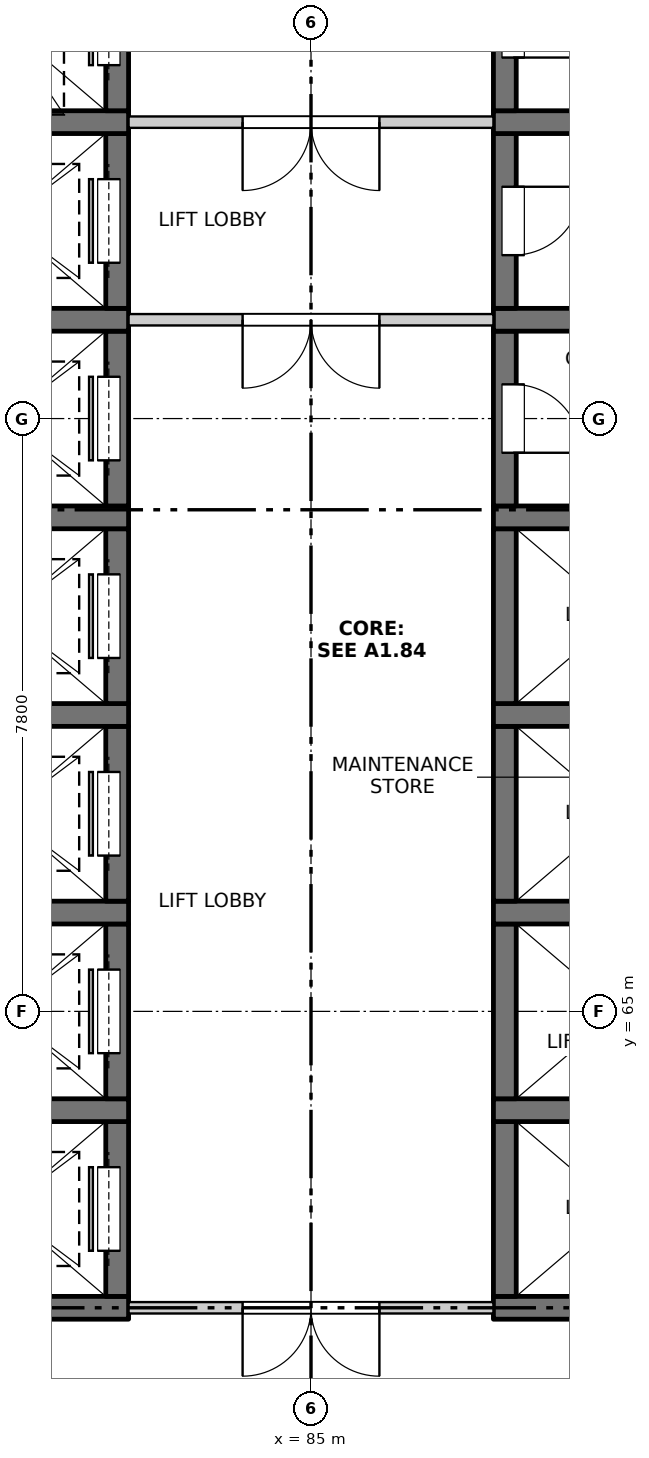
"""IFC4 building model, lengths in metres.
Left out: names, types, materials, properties, quantities, classifications, styles, units other than length and angle.
Written with IfcOpenShell. Run it as: python <this file> out.ifc"""

import sys

from ifc_helpers import new_model, si_unit, direction, frame, frame_2d, origin, place, context, subcontext, project, spatial, rectangle, extrude, element, fill, save


model = new_model("IFC4")
c1 = context("Model", 3, precision=1e-05, world=origin(), true_north=direction((0.0, 1.0)))
c2 = subcontext(c1, "Body", "Model", "MODEL_VIEW")
j1 = project(units=[si_unit("LENGTHUNIT", "METRE"), si_unit("PLANEANGLEUNIT", "RADIAN")], contexts=[c1])
p1 = place(None, origin())
s1 = spatial("IfcSite", under=j1, at=p1, CompositionType="ELEMENT")
p2 = place(p1, origin())
s2 = spatial("IfcBuilding", under=s1, at=p2, CompositionType="ELEMENT")
p3 = place(p2, frame((0.0, 0.0, 103.3)))
s3 = spatial("IfcBuildingStorey", under=s2, at=p3, CompositionType="ELEMENT", Elevation=103.3)
p4 = place(p3, frame((79.6, 61.1, -0.25), z_axis=(0.0, 0.0, 1.0), x_axis=(1.0, 0.0, 0.0)))
e1 = element("IfcWall", 1, at=p4, inside=s3, PredefinedType="SOLIDWALL", context=c2, shape_type="SweptSolid", body=[
    extrude(rectangle(XDim=3.0, YDim=0.3, at=frame_2d((1.5, 0.0))), origin(), (0.0, 0.0, 1.0), 3.4),
])
p5 = place(p3, frame((82.45, 61.25, -0.25), z_axis=(0.0, 0.0, 1.0), x_axis=(0.0, 1.0, 0.0)))
e2 = element("IfcWall", 2, at=p5, inside=s3, PredefinedType="SOLIDWALL", context=c2, shape_type="SweptSolid", body=[
    extrude(rectangle(XDim=2.3, YDim=0.3, at=frame_2d((1.15, 0.0))), origin(), (0.0, 0.0, 1.0), 3.4),
])
p6 = place(p5, frame((0.6, 0.0, 0.25)))
e3 = element("IfcOpeningElement", 3, at=p6, cuts=e2, PredefinedType="OPENING", context=c2, shape_type="SweptSolid", body=[
    extrude(rectangle(XDim=1.1, YDim=2.1, at=frame_2d((0.55, 1.05))), frame((0.0, 0.16, 0.0), z_axis=(0.0, -1.0, 0.0), x_axis=(1.0, 0.0, 0.0)), (0.0, 0.0, 1.0), 0.32),
])
p7 = place(p3, frame((79.6, 63.7, -0.25), z_axis=(0.0, 0.0, 1.0), x_axis=(1.0, 0.0, 0.0)))
e4 = element("IfcWall", 4, at=p7, inside=s3, PredefinedType="SOLIDWALL", context=c2, shape_type="SweptSolid", body=[
    extrude(rectangle(XDim=3.0, YDim=0.3, at=frame_2d((1.5, 0.0))), origin(), (0.0, 0.0, 1.0), 3.4),
])
p8 = place(p3, frame((82.45, 63.85, -0.25), z_axis=(0.0, 0.0, 1.0), x_axis=(0.0, 1.0, 0.0)))
e5 = element("IfcWall", 5, at=p8, inside=s3, PredefinedType="SOLIDWALL", context=c2, shape_type="SweptSolid", body=[
    extrude(rectangle(XDim=2.3, YDim=0.3, at=frame_2d((1.15, 0.0))), origin(), (0.0, 0.0, 1.0), 3.4),
])
p9 = place(p8, frame((0.6, 0.0, 0.25)))
e6 = element("IfcOpeningElement", 6, at=p9, cuts=e5, PredefinedType="OPENING", context=c2, shape_type="SweptSolid", body=[
    extrude(rectangle(XDim=1.1, YDim=2.1, at=frame_2d((0.55, 1.05))), frame((0.0, 0.16, 0.0), z_axis=(0.0, -1.0, 0.0), x_axis=(1.0, 0.0, 0.0)), (0.0, 0.0, 1.0), 0.32),
])
p10 = place(p3, frame((79.6, 66.3, -0.25), z_axis=(0.0, 0.0, 1.0), x_axis=(1.0, 0.0, 0.0)))
e7 = element("IfcWall", 7, at=p10, inside=s3, PredefinedType="SOLIDWALL", context=c2, shape_type="SweptSolid", body=[
    extrude(rectangle(XDim=3.0, YDim=0.3, at=frame_2d((1.5, 0.0))), origin(), (0.0, 0.0, 1.0), 3.4),
])
p11 = place(p3, frame((82.45, 66.45, -0.25), z_axis=(0.0, 0.0, 1.0), x_axis=(0.0, 1.0, 0.0)))
e8 = element("IfcWall", 8, at=p11, inside=s3, PredefinedType="SOLIDWALL", context=c2, shape_type="SweptSolid", body=[
    extrude(rectangle(XDim=2.3, YDim=0.3, at=frame_2d((1.15, 0.0))), origin(), (0.0, 0.0, 1.0), 3.4),
])
p12 = place(p11, frame((0.6, 0.0, 0.25)))
e9 = element("IfcOpeningElement", 9, at=p12, cuts=e8, PredefinedType="OPENING", context=c2, shape_type="SweptSolid", body=[
    extrude(rectangle(XDim=1.1, YDim=2.1, at=frame_2d((0.55, 1.05))), frame((0.0, 0.16, 0.0), z_axis=(0.0, -1.0, 0.0), x_axis=(1.0, 0.0, 0.0)), (0.0, 0.0, 1.0), 0.32),
])
p13 = place(p3, frame((79.6, 68.9, -0.25), z_axis=(0.0, 0.0, 1.0), x_axis=(1.0, 0.0, 0.0)))
e10 = element("IfcWall", 10, at=p13, inside=s3, PredefinedType="SOLIDWALL", context=c2, shape_type="SweptSolid", body=[
    extrude(rectangle(XDim=3.0, YDim=0.3, at=frame_2d((1.5, 0.0))), origin(), (0.0, 0.0, 1.0), 3.4),
])
p14 = place(p3, frame((82.45, 69.05, -0.25), z_axis=(0.0, 0.0, 1.0), x_axis=(0.0, 1.0, 0.0)))
e11 = element("IfcWall", 11, at=p14, inside=s3, PredefinedType="SOLIDWALL", context=c2, shape_type="SweptSolid", body=[
    extrude(rectangle(XDim=2.3, YDim=0.3, at=frame_2d((1.15, 0.0))), origin(), (0.0, 0.0, 1.0), 3.4),
])
p15 = place(p14, frame((0.6, 0.0, 0.25)))
e12 = element("IfcOpeningElement", 12, at=p15, cuts=e11, PredefinedType="OPENING", context=c2, shape_type="SweptSolid", body=[
    extrude(rectangle(XDim=1.1, YDim=2.1, at=frame_2d((0.55, 1.05))), frame((0.0, 0.16, 0.0), z_axis=(0.0, -1.0, 0.0), x_axis=(1.0, 0.0, 0.0)), (0.0, 0.0, 1.0), 0.32),
])
p16 = place(p3, frame((79.6, 71.5, -0.25), z_axis=(0.0, 0.0, 1.0), x_axis=(1.0, 0.0, 0.0)))
e13 = element("IfcWall", 13, at=p16, inside=s3, PredefinedType="SOLIDWALL", context=c2, shape_type="SweptSolid", body=[
    extrude(rectangle(XDim=3.0, YDim=0.3, at=frame_2d((1.5, 0.0))), origin(), (0.0, 0.0, 1.0), 3.4),
])
p17 = place(p3, frame((82.45, 71.65, -0.25), z_axis=(0.0, 0.0, 1.0), x_axis=(0.0, 1.0, 0.0)))
e14 = element("IfcWall", 14, at=p17, inside=s3, PredefinedType="SOLIDWALL", context=c2, shape_type="SweptSolid", body=[
    extrude(rectangle(XDim=2.3, YDim=0.3, at=frame_2d((1.15, 0.0))), origin(), (0.0, 0.0, 1.0), 3.4),
])
p18 = place(p17, frame((0.6, 0.0, 0.25)))
e15 = element("IfcOpeningElement", 15, at=p18, cuts=e14, PredefinedType="OPENING", context=c2, shape_type="SweptSolid", body=[
    extrude(rectangle(XDim=1.1, YDim=2.1, at=frame_2d((0.55, 1.05))), frame((0.0, 0.16, 0.0), z_axis=(0.0, -1.0, 0.0), x_axis=(1.0, 0.0, 0.0)), (0.0, 0.0, 1.0), 0.32),
])
p19 = place(p3, frame((79.6, 74.1, -0.25), z_axis=(0.0, 0.0, 1.0), x_axis=(1.0, 0.0, 0.0)))
e16 = element("IfcWall", 16, at=p19, inside=s3, PredefinedType="SOLIDWALL", context=c2, shape_type="SweptSolid", body=[
    extrude(rectangle(XDim=3.0, YDim=0.3, at=frame_2d((1.5, 0.0))), origin(), (0.0, 0.0, 1.0), 3.4),
])
p20 = place(p3, frame((82.45, 74.25, -0.25), z_axis=(0.0, 0.0, 1.0), x_axis=(0.0, 1.0, 0.0)))
e17 = element("IfcWall", 17, at=p20, inside=s3, PredefinedType="SOLIDWALL", context=c2, shape_type="SweptSolid", body=[
    extrude(rectangle(XDim=2.3, YDim=0.3, at=frame_2d((1.15, 0.0))), origin(), (0.0, 0.0, 1.0), 3.4),
])
p21 = place(p20, frame((0.6, 0.0, 0.25)))
e18 = element("IfcOpeningElement", 18, at=p21, cuts=e17, PredefinedType="OPENING", context=c2, shape_type="SweptSolid", body=[
    extrude(rectangle(XDim=1.1, YDim=2.1, at=frame_2d((0.55, 1.05))), frame((0.0, 0.16, 0.0), z_axis=(0.0, -1.0, 0.0), x_axis=(1.0, 0.0, 0.0)), (0.0, 0.0, 1.0), 0.32),
])
p22 = place(p3, frame((79.6, 76.7, -0.25), z_axis=(0.0, 0.0, 1.0), x_axis=(1.0, 0.0, 0.0)))
e19 = element("IfcWall", 19, at=p22, inside=s3, PredefinedType="SOLIDWALL", context=c2, shape_type="SweptSolid", body=[
    extrude(rectangle(XDim=3.0, YDim=0.3, at=frame_2d((1.5, 0.0))), origin(), (0.0, 0.0, 1.0), 3.4),
])
p23 = place(p3, frame((82.45, 76.85, -0.25), z_axis=(0.0, 0.0, 1.0), x_axis=(0.0, 1.0, 0.0)))
e20 = element("IfcWall", 20, at=p23, inside=s3, PredefinedType="SOLIDWALL", context=c2, shape_type="SweptSolid", body=[
    extrude(rectangle(XDim=2.3, YDim=0.3, at=frame_2d((1.15, 0.0))), origin(), (0.0, 0.0, 1.0), 3.4),
])
p24 = place(p23, frame((0.6, 0.0, 0.25)))
e21 = element("IfcOpeningElement", 21, at=p24, cuts=e20, PredefinedType="OPENING", context=c2, shape_type="SweptSolid", body=[
    extrude(rectangle(XDim=1.1, YDim=2.1, at=frame_2d((0.55, 1.05))), frame((0.0, 0.16, 0.0), z_axis=(0.0, -1.0, 0.0), x_axis=(1.0, 0.0, 0.0)), (0.0, 0.0, 1.0), 0.32),
])
p25 = place(p3, frame((87.4, 61.1, -0.25), z_axis=(0.0, 0.0, 1.0), x_axis=(1.0, 0.0, 0.0)))
e22 = element("IfcWall", 22, at=p25, inside=s3, PredefinedType="SOLIDWALL", context=c2, shape_type="SweptSolid", body=[
    extrude(rectangle(XDim=3.0, YDim=0.3, at=frame_2d((1.5, 0.0))), origin(), (0.0, 0.0, 1.0), 3.4),
])
p26 = place(p3, frame((87.55, 61.25, -0.25), z_axis=(0.0, 0.0, 1.0), x_axis=(0.0, 1.0, 0.0)))
e23 = element("IfcWall", 23, at=p26, inside=s3, PredefinedType="SOLIDWALL", context=c2, shape_type="SweptSolid", body=[
    extrude(rectangle(XDim=2.3, YDim=0.3, at=frame_2d((1.15, 0.0))), origin(), (0.0, 0.0, 1.0), 3.4),
])
p27 = place(p3, frame((87.4, 63.7, -0.25), z_axis=(0.0, 0.0, 1.0), x_axis=(1.0, 0.0, 0.0)))
e24 = element("IfcWall", 24, at=p27, inside=s3, PredefinedType="SOLIDWALL", context=c2, shape_type="SweptSolid", body=[
    extrude(rectangle(XDim=3.0, YDim=0.3, at=frame_2d((1.5, 0.0))), origin(), (0.0, 0.0, 1.0), 3.4),
])
p28 = place(p3, frame((87.55, 63.85, -0.25), z_axis=(0.0, 0.0, 1.0), x_axis=(0.0, 1.0, 0.0)))
e25 = element("IfcWall", 25, at=p28, inside=s3, PredefinedType="SOLIDWALL", context=c2, shape_type="SweptSolid", body=[
    extrude(rectangle(XDim=2.3, YDim=0.3, at=frame_2d((1.15, 0.0))), origin(), (0.0, 0.0, 1.0), 3.4),
])
p29 = place(p3, frame((87.4, 66.3, -0.25), z_axis=(0.0, 0.0, 1.0), x_axis=(1.0, 0.0, 0.0)))
e26 = element("IfcWall", 26, at=p29, inside=s3, PredefinedType="SOLIDWALL", context=c2, shape_type="SweptSolid", body=[
    extrude(rectangle(XDim=3.0, YDim=0.3, at=frame_2d((1.5, 0.0))), origin(), (0.0, 0.0, 1.0), 3.4),
])
p30 = place(p3, frame((87.55, 66.45, -0.25), z_axis=(0.0, 0.0, 1.0), x_axis=(0.0, 1.0, 0.0)))
e27 = element("IfcWall", 27, at=p30, inside=s3, PredefinedType="SOLIDWALL", context=c2, shape_type="SweptSolid", body=[
    extrude(rectangle(XDim=2.3, YDim=0.3, at=frame_2d((1.15, 0.0))), origin(), (0.0, 0.0, 1.0), 3.4),
])
p31 = place(p3, frame((87.4, 68.9, -0.25), z_axis=(0.0, 0.0, 1.0), x_axis=(1.0, 0.0, 0.0)))
e28 = element("IfcWall", 28, at=p31, inside=s3, PredefinedType="SOLIDWALL", context=c2, shape_type="SweptSolid", body=[
    extrude(rectangle(XDim=3.0, YDim=0.3, at=frame_2d((1.5, 0.0))), origin(), (0.0, 0.0, 1.0), 3.4),
])
p32 = place(p3, frame((87.55, 69.05, -0.25), z_axis=(0.0, 0.0, 1.0), x_axis=(0.0, 1.0, 0.0)))
e29 = element("IfcWall", 29, at=p32, inside=s3, PredefinedType="SOLIDWALL", context=c2, shape_type="SweptSolid", body=[
    extrude(rectangle(XDim=2.3, YDim=0.3, at=frame_2d((1.15, 0.0))), origin(), (0.0, 0.0, 1.0), 3.4),
])
p33 = place(p3, frame((87.4, 71.5, -0.25), z_axis=(0.0, 0.0, 1.0), x_axis=(1.0, 0.0, 0.0)))
e30 = element("IfcWall", 30, at=p33, inside=s3, PredefinedType="SOLIDWALL", context=c2, shape_type="SweptSolid", body=[
    extrude(rectangle(XDim=3.0, YDim=0.3, at=frame_2d((1.5, 0.0))), origin(), (0.0, 0.0, 1.0), 3.4),
])
p34 = place(p3, frame((87.55, 71.65, -0.25), z_axis=(0.0, 0.0, 1.0), x_axis=(0.0, 1.0, 0.0)))
e31 = element("IfcWall", 31, at=p34, inside=s3, PredefinedType="SOLIDWALL", context=c2, shape_type="SweptSolid", body=[
    extrude(rectangle(XDim=2.3, YDim=0.3, at=frame_2d((1.15, 0.0))), origin(), (0.0, 0.0, 1.0), 3.4),
])
p35 = place(p34, frame((0.7, 0.0, 0.25)))
e32 = element("IfcOpeningElement", 32, at=p35, cuts=e31, PredefinedType="OPENING", context=c2, shape_type="SweptSolid", body=[
    extrude(rectangle(XDim=0.9, YDim=2.1, at=frame_2d((0.45, 1.05))), frame((0.0, 0.16, 0.0), z_axis=(0.0, -1.0, 0.0), x_axis=(1.0, 0.0, 0.0)), (0.0, 0.0, 1.0), 0.32),
])
p36 = place(p3, frame((87.4, 74.1, -0.25), z_axis=(0.0, 0.0, 1.0), x_axis=(1.0, 0.0, 0.0)))
e33 = element("IfcWall", 33, at=p36, inside=s3, PredefinedType="SOLIDWALL", context=c2, shape_type="SweptSolid", body=[
    extrude(rectangle(XDim=3.0, YDim=0.3, at=frame_2d((1.5, 0.0))), origin(), (0.0, 0.0, 1.0), 3.4),
])
p37 = place(p3, frame((87.55, 74.25, -0.25), z_axis=(0.0, 0.0, 1.0), x_axis=(0.0, 1.0, 0.0)))
e34 = element("IfcWall", 34, at=p37, inside=s3, PredefinedType="SOLIDWALL", context=c2, shape_type="SweptSolid", body=[
    extrude(rectangle(XDim=2.3, YDim=0.3, at=frame_2d((1.15, 0.0))), origin(), (0.0, 0.0, 1.0), 3.4),
])
p38 = place(p37, frame((0.7, 0.0, 0.25)))
e35 = element("IfcOpeningElement", 35, at=p38, cuts=e34, PredefinedType="OPENING", context=c2, shape_type="SweptSolid", body=[
    extrude(rectangle(XDim=0.9, YDim=2.1, at=frame_2d((0.45, 1.05))), frame((0.0, 0.16, 0.0), z_axis=(0.0, -1.0, 0.0), x_axis=(1.0, 0.0, 0.0)), (0.0, 0.0, 1.0), 0.32),
])
p39 = place(p3, frame((87.4, 76.7, -0.25), z_axis=(0.0, 0.0, 1.0), x_axis=(1.0, 0.0, 0.0)))
e36 = element("IfcWall", 36, at=p39, inside=s3, PredefinedType="SOLIDWALL", context=c2, shape_type="SweptSolid", body=[
    extrude(rectangle(XDim=3.0, YDim=0.3, at=frame_2d((1.5, 0.0))), origin(), (0.0, 0.0, 1.0), 3.4),
])
p40 = place(p3, frame((87.55, 76.85, -0.25), z_axis=(0.0, 0.0, 1.0), x_axis=(0.0, 1.0, 0.0)))
e37 = element("IfcWall", 37, at=p40, inside=s3, PredefinedType="SOLIDWALL", context=c2, shape_type="SweptSolid", body=[
    extrude(rectangle(XDim=2.3, YDim=0.3, at=frame_2d((1.15, 0.0))), origin(), (0.0, 0.0, 1.0), 3.4),
])
p41 = place(p40, frame((0.7, 0.0, 0.25)))
e38 = element("IfcOpeningElement", 38, at=p41, cuts=e37, PredefinedType="OPENING", context=c2, shape_type="SweptSolid", body=[
    extrude(rectangle(XDim=0.9, YDim=2.1, at=frame_2d((0.45, 1.05))), frame((0.0, 0.16, 0.0), z_axis=(0.0, -1.0, 0.0), x_axis=(1.0, 0.0, 0.0)), (0.0, 0.0, 1.0), 0.32),
])
p42 = place(p3, frame((82.6, 61.1, 0.0), z_axis=(0.0, 0.0, 1.0), x_axis=(1.0, 0.0, 0.0)))
e39 = element("IfcWall", 39, at=p42, inside=s3, PredefinedType="PARTITIONING", context=c2, shape_type="SweptSolid", body=[
    extrude(rectangle(XDim=4.8, YDim=0.15, at=frame_2d((2.4, 0.0))), origin(), (0.0, 0.0, 1.0), 3.15),
])
p43 = place(p42, frame((1.5, 0.0, 0.0)))
e40 = element("IfcOpeningElement", 40, at=p43, cuts=e39, PredefinedType="OPENING", context=c2, shape_type="SweptSolid", body=[
    extrude(rectangle(XDim=1.8, YDim=2.1, at=frame_2d((0.9, 1.05))), frame((0.0, 0.085, 0.0), z_axis=(0.0, -1.0, 0.0), x_axis=(1.0, 0.0, 0.0)), (0.0, 0.0, 1.0), 0.17),
])
p44 = place(p3, frame((82.6, 74.1, 0.0), z_axis=(0.0, 0.0, 1.0), x_axis=(1.0, 0.0, 0.0)))
e41 = element("IfcWall", 41, at=p44, inside=s3, PredefinedType="PARTITIONING", context=c2, shape_type="SweptSolid", body=[
    extrude(rectangle(XDim=4.8, YDim=0.15, at=frame_2d((2.4, 0.0))), origin(), (0.0, 0.0, 1.0), 3.15),
])
p45 = place(p44, frame((1.5, 0.0, 0.0)))
e42 = element("IfcOpeningElement", 42, at=p45, cuts=e41, PredefinedType="OPENING", context=c2, shape_type="SweptSolid", body=[
    extrude(rectangle(XDim=1.8, YDim=2.1, at=frame_2d((0.9, 1.05))), frame((0.0, 0.085, 0.0), z_axis=(0.0, -1.0, 0.0), x_axis=(1.0, 0.0, 0.0)), (0.0, 0.0, 1.0), 0.17),
])
p46 = place(p3, frame((82.6, 76.7, 0.0), z_axis=(0.0, 0.0, 1.0), x_axis=(1.0, 0.0, 0.0)))
e43 = element("IfcWall", 43, at=p46, inside=s3, PredefinedType="PARTITIONING", context=c2, shape_type="SweptSolid", body=[
    extrude(rectangle(XDim=4.8, YDim=0.15, at=frame_2d((2.4, 0.0))), origin(), (0.0, 0.0, 1.0), 3.15),
])
p47 = place(p46, frame((1.5, 0.0, 0.0)))
e44 = element("IfcOpeningElement", 44, at=p47, cuts=e43, PredefinedType="OPENING", context=c2, shape_type="SweptSolid", body=[
    extrude(rectangle(XDim=1.8, YDim=2.1, at=frame_2d((0.9, 1.05))), frame((0.0, 0.085, 0.0), z_axis=(0.0, -1.0, 0.0), x_axis=(1.0, 0.0, 0.0)), (0.0, 0.0, 1.0), 0.17),
])
p48 = place(p43, origin())
e45 = element("IfcDoor", 45, at=p48, inside=s3, OperationType="DOUBLE_DOOR_SINGLE_SWING", PredefinedType="DOOR", context=c2, shape_type="SweptSolid", body=[
    extrude(rectangle(XDim=1.8, YDim=2.1, at=frame_2d((0.9, 1.05))), frame((0.0, 0.025, 0.0), z_axis=(0.0, -1.0, 0.0), x_axis=(1.0, 0.0, 0.0)), (0.0, 0.0, 1.0), 0.05),
])
fill(e40, e45)
p49 = place(p6, origin())
e46 = element("IfcDoor", 46, at=p49, inside=s3, OperationType="SLIDING_TO_RIGHT", PredefinedType="DOOR", context=c2, shape_type="SweptSolid", body=[
    extrude(rectangle(XDim=1.1, YDim=2.1, at=frame_2d((0.55, 1.05))), frame((0.0, 0.135, 0.0), z_axis=(0.0, -1.0, 0.0), x_axis=(1.0, 0.0, 0.0)), (0.0, 0.0, 1.0), 0.05),
])
fill(e3, e46)
p50 = place(p9, origin())
e47 = element("IfcDoor", 47, at=p50, inside=s3, OperationType="SLIDING_TO_RIGHT", PredefinedType="DOOR", context=c2, shape_type="SweptSolid", body=[
    extrude(rectangle(XDim=1.1, YDim=2.1, at=frame_2d((0.55, 1.05))), frame((0.0, 0.135, 0.0), z_axis=(0.0, -1.0, 0.0), x_axis=(1.0, 0.0, 0.0)), (0.0, 0.0, 1.0), 0.05),
])
fill(e6, e47)
p51 = place(p12, origin())
e48 = element("IfcDoor", 48, at=p51, inside=s3, OperationType="SLIDING_TO_RIGHT", PredefinedType="DOOR", context=c2, shape_type="SweptSolid", body=[
    extrude(rectangle(XDim=1.1, YDim=2.1, at=frame_2d((0.55, 1.05))), frame((0.0, 0.135, 0.0), z_axis=(0.0, -1.0, 0.0), x_axis=(1.0, 0.0, 0.0)), (0.0, 0.0, 1.0), 0.05),
])
fill(e9, e48)
p52 = place(p15, origin())
e49 = element("IfcDoor", 49, at=p52, inside=s3, OperationType="SLIDING_TO_LEFT", PredefinedType="DOOR", context=c2, shape_type="SweptSolid", body=[
    extrude(rectangle(XDim=1.1, YDim=2.1, at=frame_2d((0.55, 1.05))), frame((0.0, 0.135, 0.0), z_axis=(0.0, -1.0, 0.0), x_axis=(1.0, 0.0, 0.0)), (0.0, 0.0, 1.0), 0.05),
])
fill(e12, e49)
p53 = place(p18, origin())
e50 = element("IfcDoor", 50, at=p53, inside=s3, OperationType="SLIDING_TO_LEFT", PredefinedType="DOOR", context=c2, shape_type="SweptSolid", body=[
    extrude(rectangle(XDim=1.1, YDim=2.1, at=frame_2d((0.55, 1.05))), frame((0.0, 0.135, 0.0), z_axis=(0.0, -1.0, 0.0), x_axis=(1.0, 0.0, 0.0)), (0.0, 0.0, 1.0), 0.05),
])
fill(e15, e50)
p54 = place(p35, origin())
e51 = element("IfcDoor", 51, at=p54, inside=s3, OperationType="SINGLE_SWING_RIGHT", PredefinedType="DOOR", context=c2, shape_type="SweptSolid", body=[
    extrude(rectangle(XDim=0.9, YDim=2.1, at=frame_2d((0.45, 1.05))), frame((0.0, -0.085, 0.0), z_axis=(0.0, -1.0, 0.0), x_axis=(1.0, 0.0, 0.0)), (0.0, 0.0, 1.0), 0.05),
])
fill(e32, e51)
p55 = place(p45, origin())
e52 = element("IfcDoor", 52, at=p55, inside=s3, OperationType="DOUBLE_DOOR_SINGLE_SWING", PredefinedType="DOOR", context=c2, shape_type="SweptSolid", body=[
    extrude(rectangle(XDim=1.8, YDim=2.1, at=frame_2d((0.9, 1.05))), frame((0.0, 0.025, 0.0), z_axis=(0.0, -1.0, 0.0), x_axis=(1.0, 0.0, 0.0)), (0.0, 0.0, 1.0), 0.05),
])
fill(e42, e52)
p56 = place(p21, origin())
e53 = element("IfcDoor", 53, at=p56, inside=s3, OperationType="SLIDING_TO_LEFT", PredefinedType="DOOR", context=c2, shape_type="SweptSolid", body=[
    extrude(rectangle(XDim=1.1, YDim=2.1, at=frame_2d((0.55, 1.05))), frame((0.0, 0.135, 0.0), z_axis=(0.0, -1.0, 0.0), x_axis=(1.0, 0.0, 0.0)), (0.0, 0.0, 1.0), 0.05),
])
fill(e18, e53)
p57 = place(p38, origin())
e54 = element("IfcDoor", 54, at=p57, inside=s3, OperationType="SINGLE_SWING_LEFT", PredefinedType="DOOR", context=c2, shape_type="SweptSolid", body=[
    extrude(rectangle(XDim=0.9, YDim=2.1, at=frame_2d((0.45, 1.05))), frame((0.0, -0.085, 0.0), z_axis=(0.0, -1.0, 0.0), x_axis=(1.0, 0.0, 0.0)), (0.0, 0.0, 1.0), 0.05),
])
fill(e35, e54)
p58 = place(p47, origin())
e55 = element("IfcDoor", 55, at=p58, inside=s3, OperationType="DOUBLE_DOOR_SINGLE_SWING", PredefinedType="DOOR", context=c2, shape_type="SweptSolid", body=[
    extrude(rectangle(XDim=1.8, YDim=2.1, at=frame_2d((0.9, 1.05))), frame((0.0, 0.025, 0.0), z_axis=(0.0, -1.0, 0.0), x_axis=(1.0, 0.0, 0.0)), (0.0, 0.0, 1.0), 0.05),
])
fill(e44, e55)
p59 = place(p24, origin())
e56 = element("IfcDoor", 56, at=p59, inside=s3, OperationType="SLIDING_TO_LEFT", PredefinedType="DOOR", context=c2, shape_type="SweptSolid", body=[
    extrude(rectangle(XDim=1.1, YDim=2.1, at=frame_2d((0.55, 1.05))), frame((0.0, 0.135, 0.0), z_axis=(0.0, -1.0, 0.0), x_axis=(1.0, 0.0, 0.0)), (0.0, 0.0, 1.0), 0.05),
])
fill(e21, e56)
p60 = place(p41, origin())
e57 = element("IfcDoor", 57, at=p60, inside=s3, OperationType="SINGLE_SWING_RIGHT", PredefinedType="DOOR", context=c2, shape_type="SweptSolid", body=[
    extrude(rectangle(XDim=0.9, YDim=2.1, at=frame_2d((0.45, 1.05))), frame((0.0, -0.085, 0.0), z_axis=(0.0, -1.0, 0.0), x_axis=(1.0, 0.0, 0.0)), (0.0, 0.0, 1.0), 0.05),
])
fill(e38, e57)
save(model, sys.argv[1])
